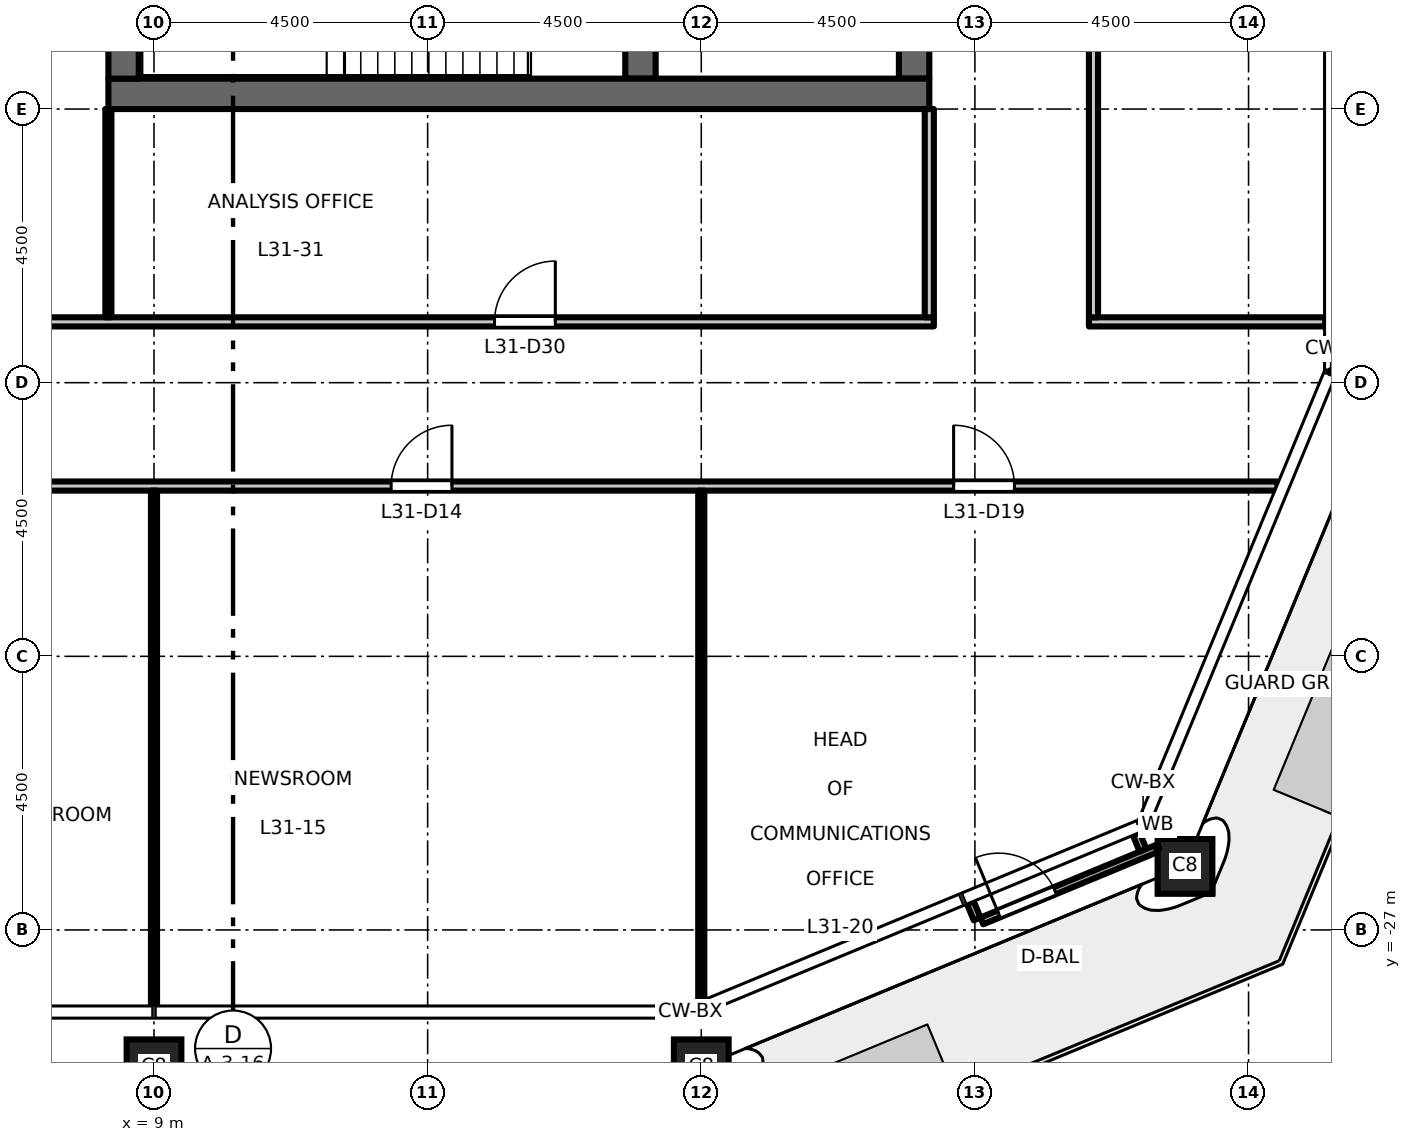
"""IFC4 building model, lengths in metres.
Left out: names, types, materials, properties, quantities, classifications, styles, units other than length and angle.
Written with IfcOpenShell. Run it as: python <this file> out.ifc"""

import sys

from ifc_helpers import new_model, si_unit, direction, frame, frame_2d, origin, origin_2d, place, context, subcontext, project, spatial, rectangle, hollow_rectangle, extrude, element, fill, save


model = new_model("IFC4")
c1 = context("Model", 3, precision=1e-05, world=origin(), true_north=direction((0.0, 1.0)))
c2 = subcontext(c1, "Body", "Model", "MODEL_VIEW")
j1 = project(units=[si_unit("LENGTHUNIT", "METRE"), si_unit("PLANEANGLEUNIT", "RADIAN")], contexts=[c1])
p1 = place(None, origin())
s1 = spatial("IfcSite", under=j1, at=p1, CompositionType="ELEMENT")
p2 = place(p1, origin())
s2 = spatial("IfcBuilding", under=s1, at=p2, CompositionType="ELEMENT")
p3 = place(p2, frame((0.0, 0.0, 145.2)))
s3 = spatial("IfcBuildingStorey", under=s2, at=p3, CompositionType="ELEMENT", Elevation=145.2)
for number, where, z_axis, x_axis in (
    (1, (9.0, -29.25, 0.0), (0.0, 0.0, 1.0), (1.0, 0.0, 0.0)),
    (2, (18.0, -29.25, 0.0), (0.0, 0.0, 1.0), (1.0, 0.0, 0.0)),
    (3, (25.955, -25.955, 0.0), (0.0, 0.0, 1.0), (1.0, 0.0, 0.0)),
):
    element("IfcColumn", number, at=place(p3, frame(where, z_axis=z_axis, x_axis=x_axis)), inside=s3, PredefinedType="COLUMN", context=c2, shape_type="SweptSolid", body=[
        extrude(hollow_rectangle(XDim=0.9, YDim=0.9, WallThickness=0.05, at=origin_2d()), origin(), (0.0, 0.0, 1.0), 4.5),
    ])
p4 = place(p3, frame((21.5, -13.0, 0.0), z_axis=(0.0, 0.0, 1.0), x_axis=(0.0, 1.0, 0.0)))
e4 = element("IfcWall", 4, at=p4, inside=s3, PredefinedType="SHEAR", context=c2, shape_type="SweptSolid", body=[
    extrude(rectangle(XDim=26.0, YDim=0.5, at=frame_2d((13.0, 0.0))), origin(), (0.0, 0.0, 1.0), 4.35),
])
p5 = place(p4, frame((16.825, 0.0, 0.0)))
e5 = element("IfcOpeningElement", 5, at=p5, cuts=e4, PredefinedType="OPENING", context=c2, shape_type="SweptSolid", body=[
    extrude(rectangle(XDim=1.8, YDim=2.1, at=frame_2d((0.9, 1.05))), frame((0.0, 0.26, 0.0), z_axis=(0.0, -1.0, 0.0), x_axis=(1.0, 0.0, 0.0)), (0.0, 0.0, 1.0), 0.52),
])
p6 = place(p4, frame((7.375, 0.0, 0.0)))
e6 = element("IfcOpeningElement", 6, at=p6, cuts=e4, PredefinedType="OPENING", context=c2, shape_type="SweptSolid", body=[
    extrude(rectangle(XDim=1.8, YDim=2.1, at=frame_2d((0.9, 1.05))), frame((0.0, 0.26, 0.0), z_axis=(0.0, -1.0, 0.0), x_axis=(1.0, 0.0, 0.0)), (0.0, 0.0, 1.0), 0.52),
])
p7 = place(p4, frame((2.65, 0.0, 0.0)))
e7 = element("IfcOpeningElement", 7, at=p7, cuts=e4, PredefinedType="OPENING", context=c2, shape_type="SweptSolid", body=[
    extrude(rectangle(XDim=0.9, YDim=2.1, at=frame_2d((0.45, 1.05))), frame((0.0, 0.26, 0.0), z_axis=(0.0, -1.0, 0.0), x_axis=(1.0, 0.0, 0.0)), (0.0, 0.0, 1.0), 0.52),
])
p8 = place(p3, frame((17.0, -13.0, 0.0), z_axis=(0.0, 0.0, 1.0), x_axis=(0.0, 1.0, 0.0)))
e8 = element("IfcWall", 8, at=p8, inside=s3, PredefinedType="SHEAR", context=c2, shape_type="SweptSolid", body=[
    extrude(rectangle(XDim=6.575, YDim=0.5, at=frame_2d((3.288, 0.0))), origin(), (0.0, 0.0, 1.0), 4.35),
])
p9 = place(p3, frame((8.25, -13.25, 0.0), z_axis=(0.0, 0.0, 1.0), x_axis=(1.0, 0.0, 0.0)))
e9 = element("IfcWall", 9, at=p9, inside=s3, PredefinedType="SHEAR", context=c2, shape_type="SweptSolid", body=[
    extrude(rectangle(XDim=13.5, YDim=0.5, at=frame_2d((6.75, 0.0))), origin(), (0.0, 0.0, 1.0), 4.35),
])
p10 = place(p3, frame((8.5, -13.0, 0.0), z_axis=(0.0, 0.0, 1.0), x_axis=(0.0, 1.0, 0.0)))
e10 = element("IfcWall", 10, at=p10, inside=s3, PredefinedType="SHEAR", context=c2, shape_type="SweptSolid", body=[
    extrude(rectangle(XDim=26.0, YDim=0.5, at=frame_2d((13.0, 0.0))), origin(), (0.0, 0.0, 1.0), 4.35),
])
for number, where, z_axis, x_axis in (
    (11, (22.425, -26.551, 0.0), (0.0, 0.0, 1.0), (0.382, -0.924, 0.0)),
    (12, (25.153, -25.421, 0.0), (0.0, 0.0, 1.0), (0.383, -0.924, 0.0)),
):
    element("IfcWall", number, at=place(p3, frame(where, z_axis=z_axis, x_axis=x_axis)), inside=s3, PredefinedType="STANDARD", context=c2, shape_type="SweptSolid", body=[
        extrude(rectangle(XDim=0.29, YDim=0.12, at=frame_2d((0.145, 0.0))), origin(), (0.0, 0.0, 1.0), 4.35),
    ])
p11 = place(p3, frame((22.615, -26.852, 0.0), z_axis=(0.0, 0.0, 1.0), x_axis=(0.923876066186, 0.382691800707, 0.0)))
e13 = element("IfcWall", 13, at=p11, inside=s3, PredefinedType="STANDARD", context=c2, shape_type="SweptSolid", body=[
    extrude(rectangle(XDim=3.128, YDim=0.12, at=frame_2d((1.564, 0.0))), origin(), (0.0, 0.0, 1.0), 4.35),
])
p12 = place(p11, frame((0.3, 0.0, 0.0)))
e14 = element("IfcOpeningElement", 14, at=p12, cuts=e13, PredefinedType="OPENING", context=c2, shape_type="SweptSolid", body=[
    extrude(rectangle(XDim=1.0, YDim=2.4, at=frame_2d((0.5, 1.2))), frame((0.0, 0.07, 0.0), z_axis=(0.0, -1.0, 0.0), x_axis=(1.0, 0.0, 0.0)), (0.0, 0.0, 1.0), 0.14),
])
p13 = place(p3, frame((-27.474, -19.7, 0.0), z_axis=(0.0, 0.0, 1.0), x_axis=(1.0, 0.0, 0.0)))
e15 = element("IfcWall", 15, at=p13, inside=s3, PredefinedType="PARTITIONING", context=c2, shape_type="SweptSolid", body=[
    extrude(rectangle(XDim=54.948, YDim=0.15, at=frame_2d((27.474, 0.0))), origin(), (0.0, 0.0, 1.0), 4.35),
])
p14 = place(p13, frame((13.374, 0.0, 0.0)))
e16 = element("IfcOpeningElement", 16, at=p14, cuts=e15, PredefinedType="OPENING", context=c2, shape_type="SweptSolid", body=[
    extrude(rectangle(XDim=1.0, YDim=2.1, at=frame_2d((0.5, 1.05))), frame((0.0, 0.085, 0.0), z_axis=(0.0, -1.0, 0.0), x_axis=(1.0, 0.0, 0.0)), (0.0, 0.0, 1.0), 0.17),
])
p15 = place(p13, frame((22.374, 0.0, 0.0)))
e17 = element("IfcOpeningElement", 17, at=p15, cuts=e15, PredefinedType="OPENING", context=c2, shape_type="SweptSolid", body=[
    extrude(rectangle(XDim=1.0, YDim=2.1, at=frame_2d((0.5, 1.05))), frame((0.0, 0.085, 0.0), z_axis=(0.0, -1.0, 0.0), x_axis=(1.0, 0.0, 0.0)), (0.0, 0.0, 1.0), 0.17),
])
p16 = place(p13, frame((31.374, 0.0, 0.0)))
e18 = element("IfcOpeningElement", 18, at=p16, cuts=e15, PredefinedType="OPENING", context=c2, shape_type="SweptSolid", body=[
    extrude(rectangle(XDim=1.0, YDim=2.1, at=frame_2d((0.5, 1.05))), frame((0.0, 0.085, 0.0), z_axis=(0.0, -1.0, 0.0), x_axis=(1.0, 0.0, 0.0)), (0.0, 0.0, 1.0), 0.17),
])
p17 = place(p13, frame((40.374, 0.0, 0.0)))
e19 = element("IfcOpeningElement", 19, at=p17, cuts=e15, PredefinedType="OPENING", context=c2, shape_type="SweptSolid", body=[
    extrude(rectangle(XDim=1.0, YDim=2.1, at=frame_2d((0.5, 1.05))), frame((0.0, 0.085, 0.0), z_axis=(0.0, -1.0, 0.0), x_axis=(1.0, 0.0, 0.0)), (0.0, 0.0, 1.0), 0.17),
])
p18 = place(p13, frame((4.15, 0.0, 0.0)))
e20 = element("IfcOpeningElement", 20, at=p18, cuts=e15, PredefinedType="OPENING", context=c2, shape_type="SweptSolid", body=[
    extrude(rectangle(XDim=1.0, YDim=2.1, at=frame_2d((0.5, 1.05))), frame((0.0, 0.085, 0.0), z_axis=(0.0, -1.0, 0.0), x_axis=(1.0, 0.0, 0.0)), (0.0, 0.0, 1.0), 0.17),
])
p19 = place(p13, frame((49.624, 0.0, 0.0)))
e21 = element("IfcOpeningElement", 21, at=p19, cuts=e15, PredefinedType="OPENING", context=c2, shape_type="SweptSolid", body=[
    extrude(rectangle(XDim=1.0, YDim=2.1, at=frame_2d((0.5, 1.05))), frame((0.0, 0.085, 0.0), z_axis=(0.0, -1.0, 0.0), x_axis=(1.0, 0.0, 0.0)), (0.0, 0.0, 1.0), 0.17),
])
p20 = place(p3, frame((-21.825, -17.0, 0.0), z_axis=(0.0, 0.0, 1.0), x_axis=(1.0, 0.0, 0.0)))
e22 = element("IfcWall", 22, at=p20, inside=s3, PredefinedType="PARTITIONING", context=c2, shape_type="SweptSolid", body=[
    extrude(rectangle(XDim=43.65, YDim=0.15, at=frame_2d((21.825, 0.0))), origin(), (0.0, 0.0, 1.0), 4.35),
])
p21 = place(p20, frame((17.175, 0.0, 0.0)))
e23 = element("IfcOpeningElement", 23, at=p21, cuts=e22, PredefinedType="OPENING", context=c2, shape_type="SweptSolid", body=[
    extrude(rectangle(XDim=1.0, YDim=2.1, at=frame_2d((0.5, 1.05))), frame((0.0, 0.085, 0.0), z_axis=(0.0, -1.0, 0.0), x_axis=(1.0, 0.0, 0.0)), (0.0, 0.0, 1.0), 0.17),
])
p22 = place(p20, frame((25.425, 0.0, 0.0)))
e24 = element("IfcOpeningElement", 24, at=p22, cuts=e22, PredefinedType="OPENING", context=c2, shape_type="SweptSolid", body=[
    extrude(rectangle(XDim=1.0, YDim=2.1, at=frame_2d((0.5, 1.05))), frame((0.0, 0.085, 0.0), z_axis=(0.0, -1.0, 0.0), x_axis=(1.0, 0.0, 0.0)), (0.0, 0.0, 1.0), 0.17),
])
p23 = place(p20, frame((6.425, 0.0, 0.0)))
e25 = element("IfcOpeningElement", 25, at=p23, cuts=e22, PredefinedType="OPENING", context=c2, shape_type="SweptSolid", body=[
    extrude(rectangle(XDim=1.0, YDim=2.1, at=frame_2d((0.5, 1.05))), frame((0.0, 0.085, 0.0), z_axis=(0.0, -1.0, 0.0), x_axis=(1.0, 0.0, 0.0)), (0.0, 0.0, 1.0), 0.17),
])
p24 = place(p20, frame((36.425, 0.0, 0.0)))
e26 = element("IfcOpeningElement", 26, at=p24, cuts=e22, PredefinedType="OPENING", context=c2, shape_type="SweptSolid", body=[
    extrude(rectangle(XDim=1.0, YDim=2.1, at=frame_2d((0.5, 1.05))), frame((0.0, 0.085, 0.0), z_axis=(0.0, -1.0, 0.0), x_axis=(1.0, 0.0, 0.0)), (0.0, 0.0, 1.0), 0.17),
])
p25 = place(p3, frame((24.375, -17.0, 0.0), z_axis=(0.0, 0.0, 1.0), x_axis=(1.0, 0.0, 0.0)))
e27 = element("IfcWall", 27, at=p25, inside=s3, PredefinedType="PARTITIONING", context=c2, shape_type="SweptSolid", body=[
    extrude(rectangle(XDim=3.885, YDim=0.15, at=frame_2d((1.942, 0.0))), origin(), (0.0, 0.0, 1.0), 4.35),
])
p26 = place(p3, frame((8.25, -16.925, 0.0), z_axis=(0.0, 0.0, 1.0), x_axis=(0.0, 1.0, 0.0)))
e28 = element("IfcWall", 28, at=p26, inside=s3, PredefinedType="PARTITIONING", context=c2, shape_type="SweptSolid", body=[
    extrude(rectangle(XDim=3.425, YDim=0.1, at=frame_2d((1.712, 0.0))), origin(), (0.0, 0.0, 1.0), 4.35),
])
p27 = place(p3, frame((9.0, -28.26, 0.0), z_axis=(0.0, 0.0, 1.0), x_axis=(0.0, 1.0, 0.0)))
e29 = element("IfcWall", 29, at=p27, inside=s3, PredefinedType="PARTITIONING", context=c2, shape_type="SweptSolid", body=[
    extrude(rectangle(XDim=8.485, YDim=0.1, at=frame_2d((4.243, 0.0))), origin(), (0.0, 0.0, 1.0), 3.45),
])
p28 = place(p3, frame((18.0, -28.178, 0.0), z_axis=(0.0, 0.0, 1.0), x_axis=(0.0, 1.0, 0.0)))
e30 = element("IfcWall", 30, at=p28, inside=s3, PredefinedType="PARTITIONING", context=c2, shape_type="SweptSolid", body=[
    extrude(rectangle(XDim=8.403, YDim=0.1, at=frame_2d((4.202, 0.0))), origin(), (0.0, 0.0, 1.0), 3.45),
])
p29 = place(p3, frame((21.75, -16.925, 0.0), z_axis=(0.0, 0.0, 1.0), x_axis=(0.0, 1.0, 0.0)))
e31 = element("IfcWall", 31, at=p29, inside=s3, PredefinedType="PARTITIONING", context=c2, shape_type="SweptSolid", body=[
    extrude(rectangle(XDim=3.425, YDim=0.15, at=frame_2d((1.712, 0.0))), origin(), (0.0, 0.0, 1.0), 4.35),
])
p30 = place(p3, frame((24.45, -16.925, 0.0), z_axis=(0.0, 0.0, 1.0), x_axis=(0.0, 1.0, 0.0)))
e32 = element("IfcWall", 32, at=p30, inside=s3, PredefinedType="PARTITIONING", context=c2, shape_type="SweptSolid", body=[
    extrude(rectangle(XDim=33.85, YDim=0.15, at=frame_2d((16.925, 0.0))), origin(), (0.0, 0.0, 1.0), 4.35),
])
p31 = place(p30, frame((16.325, 0.0, 0.0)))
e33 = element("IfcOpeningElement", 33, at=p31, cuts=e32, PredefinedType="OPENING", context=c2, shape_type="SweptSolid", body=[
    extrude(rectangle(XDim=1.0, YDim=2.1, at=frame_2d((0.5, 1.05))), frame((0.0, 0.085, 0.0), z_axis=(0.0, -1.0, 0.0), x_axis=(1.0, 0.0, 0.0)), (0.0, 0.0, 1.0), 0.17),
])
p32 = place(p12, origin())
e34 = element("IfcDoor", 34, at=p32, inside=s3, OperationType="SINGLE_SWING_LEFT", PredefinedType="DOOR", context=c2, shape_type="SweptSolid", body=[
    extrude(rectangle(XDim=1.0, YDim=2.4, at=frame_2d((0.5, 1.2))), frame((0.0, 0.025, 0.0), z_axis=(0.0, -1.0, 0.0), x_axis=(1.0, 0.0, 0.0)), (0.0, 0.0, 1.0), 0.05),
])
fill(e14, e34)
p33 = place(p17, origin())
e35 = element("IfcDoor", 35, at=p33, inside=s3, OperationType="SINGLE_SWING_RIGHT", PredefinedType="DOOR", context=c2, shape_type="SweptSolid", body=[
    extrude(rectangle(XDim=1.0, YDim=2.1, at=frame_2d((0.5, 1.05))), frame((0.0, 0.025, 0.0), z_axis=(0.0, -1.0, 0.0), x_axis=(1.0, 0.0, 0.0)), (0.0, 0.0, 1.0), 0.05),
])
fill(e19, e35)
p34 = place(p19, origin())
e36 = element("IfcDoor", 36, at=p34, inside=s3, OperationType="SINGLE_SWING_LEFT", PredefinedType="DOOR", context=c2, shape_type="SweptSolid", body=[
    extrude(rectangle(XDim=1.0, YDim=2.1, at=frame_2d((0.5, 1.05))), frame((0.0, 0.025, 0.0), z_axis=(0.0, -1.0, 0.0), x_axis=(1.0, 0.0, 0.0)), (0.0, 0.0, 1.0), 0.05),
])
fill(e21, e36)
p35 = place(p24, origin())
e37 = element("IfcDoor", 37, at=p35, inside=s3, OperationType="SINGLE_SWING_RIGHT", PredefinedType="DOOR", context=c2, shape_type="SweptSolid", body=[
    extrude(rectangle(XDim=1.0, YDim=2.1, at=frame_2d((0.5, 1.05))), frame((0.0, 0.025, 0.0), z_axis=(0.0, -1.0, 0.0), x_axis=(1.0, 0.0, 0.0)), (0.0, 0.0, 1.0), 0.05),
])
fill(e26, e37)
save(model, sys.argv[1])
